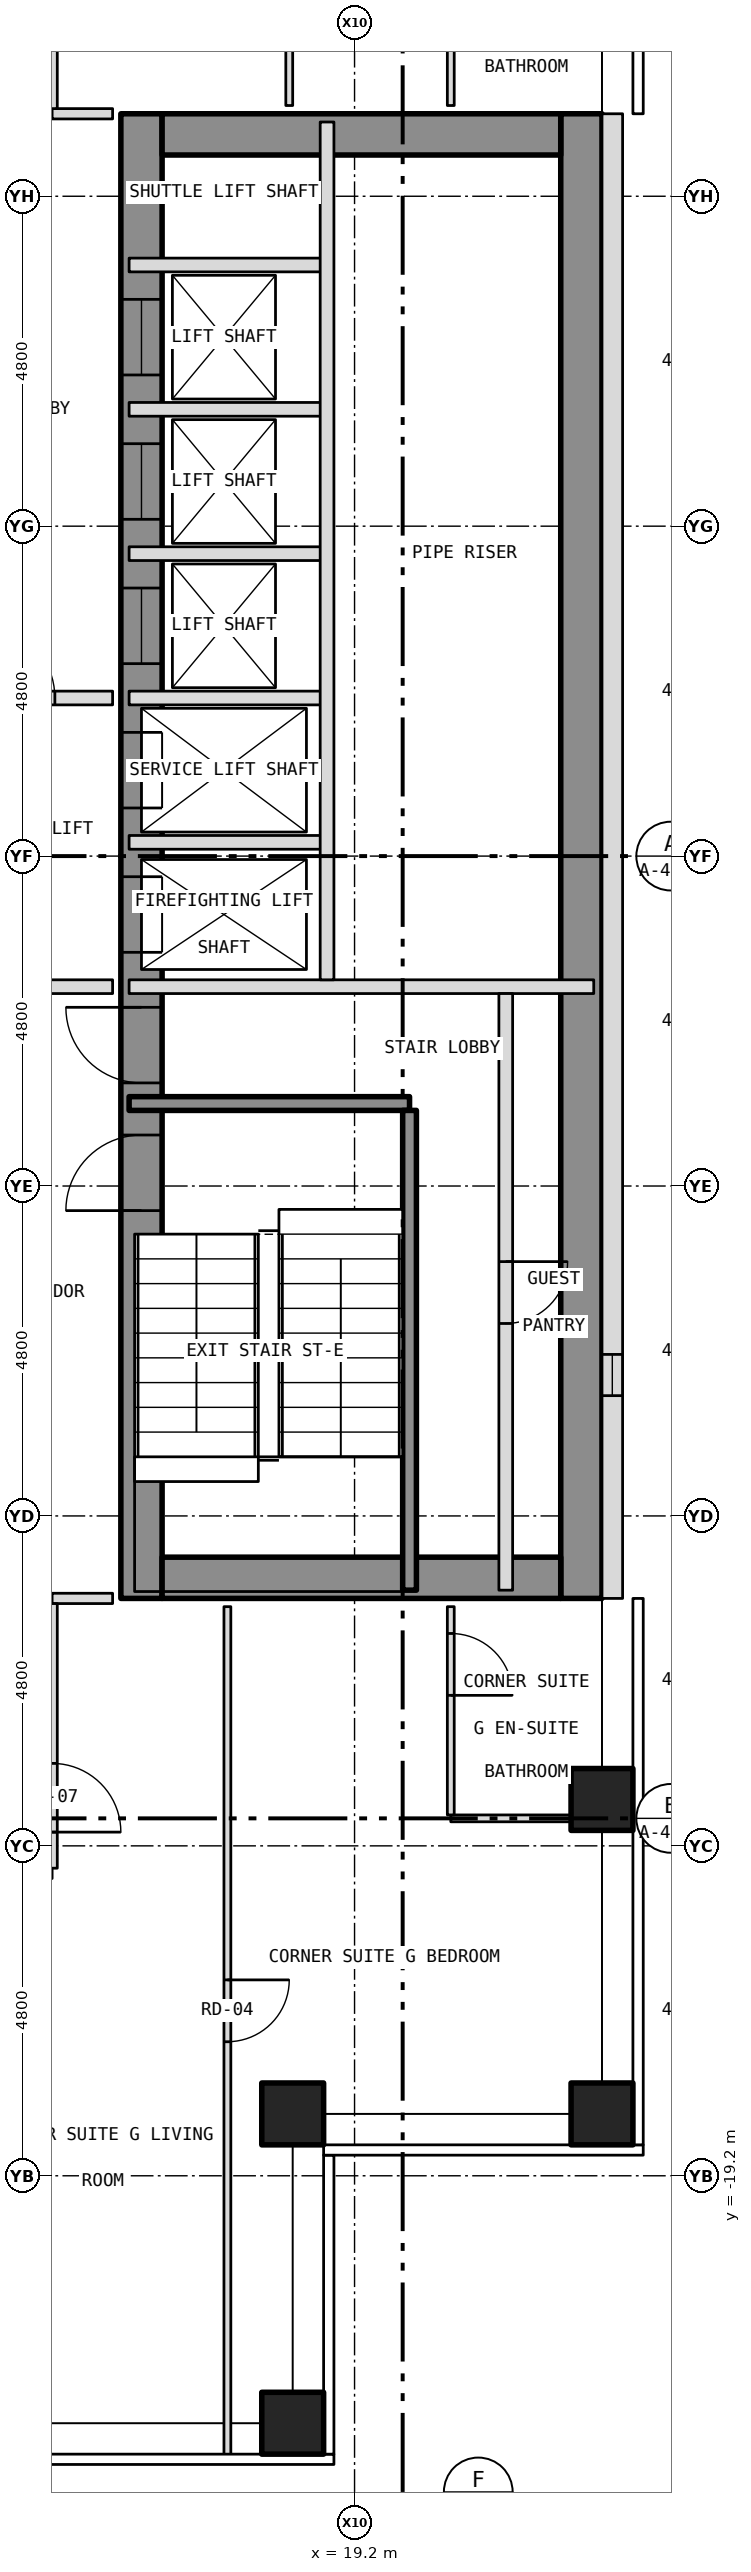
"""IFC4 building model, lengths in metres.
Left out: names, types, materials, properties, quantities, classifications, styles, units other than length and angle.
Written with IfcOpenShell. Run it as: python <this file> out.ifc"""

import sys

from ifc_helpers import new_model, si_unit, direction, frame, frame_2d, origin, origin_2d, place, context, subcontext, project, spatial, rectangle, hollow_rectangle, extrude, element, fill, save


model = new_model("IFC4")
c1 = context("Model", 3, precision=1e-05, world=origin(), true_north=direction((0.0, 1.0)))
c2 = subcontext(c1, "Body", "Model", "MODEL_VIEW")
j1 = project(units=[si_unit("LENGTHUNIT", "METRE"), si_unit("PLANEANGLEUNIT", "RADIAN")], contexts=[c1])
p1 = place(None, origin())
s1 = spatial("IfcSite", under=j1, at=p1, CompositionType="ELEMENT")
p2 = place(p1, origin())
s2 = spatial("IfcBuilding", under=s1, at=p2, CompositionType="ELEMENT")
p3 = place(p2, frame((0.0, 0.0, 124.0)))
s3 = spatial("IfcBuildingStorey", under=s2, at=p3, CompositionType="ELEMENT", Elevation=124.0)
for number, where, z_axis, x_axis in (
    (1, (18.3, -22.8, -0.15), (0.0, 0.0, 1.0), (1.0, 0.0, 0.0)),
    (2, (22.8, -18.3, -0.15), (0.0, 0.0, 1.0), (1.0, 0.0, 0.0)),
    (3, (22.8, -13.725, -0.15), (0.0, 0.0, 1.0), (1.0, 0.0, 0.0)),
    (4, (18.3, -18.3, -0.15), (0.0, 0.0, 1.0), (1.0, 0.0, 0.0)),
):
    element("IfcColumn", number, at=place(p3, frame(where, z_axis=z_axis, x_axis=x_axis)), inside=s3, PredefinedType="COLUMN", context=c2, shape_type="SweptSolid", body=[
        extrude(hollow_rectangle(XDim=0.9, YDim=0.9, WallThickness=0.05, at=origin_2d()), origin(), (0.0, 0.0, 1.0), 3.5),
    ])
p4 = place(p3, frame((16.1, -10.8, 0.0), z_axis=(0.0, 0.0, 1.0), x_axis=(0.0, 1.0, 0.0)))
e5 = element("IfcWall", 5, at=p4, inside=s3, PredefinedType="SHEAR", context=c2, shape_type="SweptSolid", body=[
    extrude(rectangle(XDim=21.6, YDim=0.6, at=frame_2d((10.8, 0.0))), origin(), (0.0, 0.0, 1.0), 3.25),
])
p5 = place(p4, frame((9.4, 0.0, 0.0)))
e6 = element("IfcOpeningElement", 6, at=p5, cuts=e5, PredefinedType="OPENING", context=c2, shape_type="SweptSolid", body=[
    extrude(rectangle(XDim=1.1, YDim=2.1, at=frame_2d((0.55, 1.05))), frame((0.0, 0.312, 0.0), z_axis=(0.0, -1.0, 0.0), x_axis=(1.0, 0.0, 0.0)), (0.0, 0.0, 1.0), 0.624),
])
p6 = place(p4, frame((11.5, 0.0, 0.0)))
e7 = element("IfcOpeningElement", 7, at=p6, cuts=e5, PredefinedType="OPENING", context=c2, shape_type="SweptSolid", body=[
    extrude(rectangle(XDim=1.1, YDim=2.1, at=frame_2d((0.55, 1.05))), frame((0.0, 0.312, 0.0), z_axis=(0.0, -1.0, 0.0), x_axis=(1.0, 0.0, 0.0)), (0.0, 0.0, 1.0), 0.624),
])
p7 = place(p4, frame((13.6, 0.0, 0.0)))
e8 = element("IfcOpeningElement", 8, at=p7, cuts=e5, PredefinedType="OPENING", context=c2, shape_type="SweptSolid", body=[
    extrude(rectangle(XDim=1.1, YDim=2.1, at=frame_2d((0.55, 1.05))), frame((0.0, 0.312, 0.0), z_axis=(0.0, -1.0, 0.0), x_axis=(1.0, 0.0, 0.0)), (0.0, 0.0, 1.0), 0.624),
])
p8 = place(p4, frame((15.7, 0.0, 0.0)))
e9 = element("IfcOpeningElement", 9, at=p8, cuts=e5, PredefinedType="OPENING", context=c2, shape_type="SweptSolid", body=[
    extrude(rectangle(XDim=1.1, YDim=2.1, at=frame_2d((0.55, 1.05))), frame((0.0, 0.312, 0.0), z_axis=(0.0, -1.0, 0.0), x_axis=(1.0, 0.0, 0.0)), (0.0, 0.0, 1.0), 0.624),
])
p9 = place(p4, frame((17.8, 0.0, 0.0)))
e10 = element("IfcOpeningElement", 10, at=p9, cuts=e5, PredefinedType="OPENING", context=c2, shape_type="SweptSolid", body=[
    extrude(rectangle(XDim=1.1, YDim=2.1, at=frame_2d((0.55, 1.05))), frame((0.0, 0.312, 0.0), z_axis=(0.0, -1.0, 0.0), x_axis=(1.0, 0.0, 0.0)), (0.0, 0.0, 1.0), 0.624),
])
p10 = place(p4, frame((5.642, 0.0, 0.0)))
e11 = element("IfcOpeningElement", 11, at=p10, cuts=e5, PredefinedType="OPENING", context=c2, shape_type="SweptSolid", body=[
    extrude(rectangle(XDim=1.1, YDim=2.1, at=frame_2d((0.55, 1.05))), frame((0.0, 0.312, 0.0), z_axis=(0.0, -1.0, 0.0), x_axis=(1.0, 0.0, 0.0)), (0.0, 0.0, 1.0), 0.624),
])
p11 = place(p4, frame((7.5, 0.0, 0.0)))
e12 = element("IfcOpeningElement", 12, at=p11, cuts=e5, PredefinedType="OPENING", context=c2, shape_type="SweptSolid", body=[
    extrude(rectangle(XDim=1.1, YDim=2.1, at=frame_2d((0.55, 1.05))), frame((0.0, 0.312, 0.0), z_axis=(0.0, -1.0, 0.0), x_axis=(1.0, 0.0, 0.0)), (0.0, 0.0, 1.0), 0.624),
])
p12 = place(p3, frame((22.5, -10.8, 0.0), z_axis=(0.0, 0.0, 1.0), x_axis=(0.0, 1.0, 0.0)))
e13 = element("IfcWall", 13, at=p12, inside=s3, PredefinedType="SHEAR", context=c2, shape_type="SweptSolid", body=[
    extrude(rectangle(XDim=21.6, YDim=0.6, at=frame_2d((10.8, 0.0))), origin(), (0.0, 0.0, 1.0), 3.25),
])
for number, where, z_axis, x_axis in (
    (14, (16.4, 10.5, 0.0), (0.0, 0.0, 1.0), (1.0, 0.0, 0.0)),
    (15, (16.4, -10.5, 0.0), (0.0, 0.0, 1.0), (1.0, 0.0, 0.0)),
):
    element("IfcWall", number, at=place(p3, frame(where, z_axis=z_axis, x_axis=x_axis)), inside=s3, PredefinedType="SHEAR", context=c2, shape_type="SweptSolid", body=[
        extrude(rectangle(XDim=5.8, YDim=0.6, at=frame_2d((2.9, 0.0))), origin(), (0.0, 0.0, 1.0), 3.25),
    ])
p13 = place(p3, frame((22.95, -10.8, 0.0), z_axis=(0.0, 0.0, 1.0), x_axis=(0.0, 1.0, 0.0)))
e16 = element("IfcWall", 16, at=p13, inside=s3, PredefinedType="SOLIDWALL", context=c2, shape_type="SweptSolid", body=[
    extrude(rectangle(XDim=21.6, YDim=0.3, at=frame_2d((10.8, 0.0))), origin(), (0.0, 0.0, 1.0), 3.5),
])
p14 = place(p13, frame((2.95, 0.0, 1.0)))
e17 = element("IfcOpeningElement", 17, at=p14, cuts=e16, PredefinedType="OPENING", context=c2, shape_type="SweptSolid", body=[
    extrude(rectangle(XDim=0.6, YDim=1.5, at=frame_2d((0.3, 0.75))), frame((0.0, 0.162, 0.0), z_axis=(0.0, -1.0, 0.0), x_axis=(1.0, 0.0, 0.0)), (0.0, 0.0, 1.0), 0.324),
])
p15 = place(p3, frame((20.6, -14.0, 0.0), z_axis=(0.0, 0.0, 1.0), x_axis=(1.0, 0.0, 0.0)))
e18 = element("IfcWall", 18, at=p15, inside=s3, PredefinedType="PARTITIONING", context=c2, shape_type="SweptSolid", body=[
    extrude(rectangle(XDim=2.08, YDim=0.1, at=frame_2d((1.04, 0.0))), origin(), (0.0, 0.0, 1.0), 3.35),
])
p16 = place(p3, frame((14.8, -10.8, 0.0), z_axis=(0.0, 0.0, 1.0), x_axis=(1.0, 0.0, 0.0)))
e19 = element("IfcWall", 19, at=p16, inside=s3, PredefinedType="PARTITIONING", context=c2, shape_type="SweptSolid", body=[
    extrude(rectangle(XDim=0.88, YDim=0.15, at=frame_2d((0.44, 0.0))), origin(), (0.0, 0.0, 1.0), 3.35),
])
p17 = place(p3, frame((15.92, -3.6, 0.0), z_axis=(0.0, 0.0, 1.0), x_axis=(1.0, 0.0, 0.0)))
e20 = element("IfcWall", 20, at=p17, inside=s3, PredefinedType="SHEAR", context=c2, shape_type="SweptSolid", body=[
    extrude(rectangle(XDim=4.08, YDim=0.2, at=frame_2d((2.04, 0.0))), origin(), (0.0, 0.0, 1.0), 3.25),
])
p18 = place(p3, frame((12.4, -1.9, 0.0), z_axis=(0.0, 0.0, 1.0), x_axis=(1.0, 0.0, 0.0)))
e21 = element("IfcWall", 21, at=p18, inside=s3, PredefinedType="PARTITIONING", context=c2, shape_type="SweptSolid", body=[
    extrude(rectangle(XDim=3.28, YDim=0.2, at=frame_2d((1.64, 0.0))), origin(), (0.0, 0.0, 1.0), 3.35),
])
p19 = place(p18, frame((1.24, 0.0, 0.0)))
e22 = element("IfcOpeningElement", 22, at=p19, cuts=e21, PredefinedType="OPENING", context=c2, shape_type="SweptSolid", body=[
    extrude(rectangle(XDim=1.1, YDim=2.1, at=frame_2d((0.55, 1.05))), frame((0.0, 0.112, 0.0), z_axis=(0.0, -1.0, 0.0), x_axis=(1.0, 0.0, 0.0)), (0.0, 0.0, 1.0), 0.224),
])
p20 = place(p3, frame((15.92, -1.9, 0.0), z_axis=(0.0, 0.0, 1.0), x_axis=(1.0, 0.0, 0.0)))
e23 = element("IfcWall", 23, at=p20, inside=s3, PredefinedType="PARTITIONING", context=c2, shape_type="SweptSolid", body=[
    extrude(rectangle(XDim=6.76, YDim=0.2, at=frame_2d((3.38, 0.0))), origin(), (0.0, 0.0, 1.0), 3.25),
])
p21 = place(p3, frame((15.92, 0.2, 0.0), z_axis=(0.0, 0.0, 1.0), x_axis=(1.0, 0.0, 0.0)))
e24 = element("IfcWall", 24, at=p21, inside=s3, PredefinedType="PARTITIONING", context=c2, shape_type="SweptSolid", body=[
    extrude(rectangle(XDim=2.88, YDim=0.2, at=frame_2d((1.44, 0.0))), origin(), (0.0, 0.0, 1.0), 3.25),
])
p22 = place(p3, frame((12.4, 2.3, 0.0), z_axis=(0.0, 0.0, 1.0), x_axis=(1.0, 0.0, 0.0)))
e25 = element("IfcWall", 25, at=p22, inside=s3, PredefinedType="PARTITIONING", context=c2, shape_type="SweptSolid", body=[
    extrude(rectangle(XDim=3.28, YDim=0.2, at=frame_2d((1.64, 0.0))), origin(), (0.0, 0.0, 1.0), 3.35),
])
p23 = place(p22, frame((1.34, 0.0, 0.0)))
e26 = element("IfcOpeningElement", 26, at=p23, cuts=e25, PredefinedType="OPENING", context=c2, shape_type="SweptSolid", body=[
    extrude(rectangle(XDim=1.1, YDim=2.1, at=frame_2d((0.55, 1.05))), frame((0.0, 0.112, 0.0), z_axis=(0.0, -1.0, 0.0), x_axis=(1.0, 0.0, 0.0)), (0.0, 0.0, 1.0), 0.224),
])
for number, where, z_axis, x_axis in (
    (27, (15.92, 2.3, 0.0), (0.0, 0.0, 1.0), (1.0, 0.0, 0.0)),
    (28, (15.92, 4.4, 0.0), (0.0, 0.0, 1.0), (1.0, 0.0, 0.0)),
    (29, (15.92, 6.5, 0.0), (0.0, 0.0, 1.0), (1.0, 0.0, 0.0)),
    (30, (15.92, 8.6, 0.0), (0.0, 0.0, 1.0), (1.0, 0.0, 0.0)),
):
    element("IfcWall", number, at=place(p3, frame(where, z_axis=z_axis, x_axis=x_axis)), inside=s3, PredefinedType="PARTITIONING", context=c2, shape_type="SweptSolid", body=[
        extrude(rectangle(XDim=2.88, YDim=0.2, at=frame_2d((1.44, 0.0))), origin(), (0.0, 0.0, 1.0), 3.25),
    ])
p24 = place(p3, frame((14.8, 10.8, 0.0), z_axis=(0.0, 0.0, 1.0), x_axis=(1.0, 0.0, 0.0)))
e31 = element("IfcWall", 31, at=p24, inside=s3, PredefinedType="PARTITIONING", context=c2, shape_type="SweptSolid", body=[
    extrude(rectangle(XDim=0.88, YDim=0.15, at=frame_2d((0.44, 0.0))), origin(), (0.0, 0.0, 1.0), 3.35),
])
p25 = place(p3, frame((14.8, -14.725, 0.0), z_axis=(0.0, 0.0, 1.0), x_axis=(0.0, 1.0, 0.0)))
e32 = element("IfcWall", 32, at=p25, inside=s3, PredefinedType="PARTITIONING", context=c2, shape_type="SweptSolid", body=[
    extrude(rectangle(XDim=3.85, YDim=0.15, at=frame_2d((1.925, 0.0))), origin(), (0.0, 0.0, 1.0), 3.35),
])
p26 = place(p25, frame((0.525, 0.0, 0.0)))
e33 = element("IfcOpeningElement", 33, at=p26, cuts=e32, PredefinedType="OPENING", context=c2, shape_type="SweptSolid", body=[
    extrude(rectangle(XDim=1.0, YDim=2.1, at=frame_2d((0.5, 1.05))), frame((0.0, 0.087, 0.0), z_axis=(0.0, -1.0, 0.0), x_axis=(1.0, 0.0, 0.0)), (0.0, 0.0, 1.0), 0.174),
])
p27 = place(p3, frame((14.8, 10.875, 0.0), z_axis=(0.0, 0.0, 1.0), x_axis=(0.0, 1.0, 0.0)))
e34 = element("IfcWall", 34, at=p27, inside=s3, PredefinedType="PARTITIONING", context=c2, shape_type="SweptSolid", body=[
    extrude(rectangle(XDim=3.85, YDim=0.15, at=frame_2d((1.925, 0.0))), origin(), (0.0, 0.0, 1.0), 3.35),
])
p28 = place(p27, frame((2.325, 0.0, 0.0)))
e35 = element("IfcOpeningElement", 35, at=p28, cuts=e34, PredefinedType="OPENING", context=c2, shape_type="SweptSolid", body=[
    extrude(rectangle(XDim=1.0, YDim=2.1, at=frame_2d((0.5, 1.05))), frame((0.0, 0.087, 0.0), z_axis=(0.0, -1.0, 0.0), x_axis=(1.0, 0.0, 0.0)), (0.0, 0.0, 1.0), 0.174),
])
p29 = place(p3, frame((17.35, -23.28, 0.0), z_axis=(0.0, 0.0, 1.0), x_axis=(0.0, 1.0, 0.0)))
e36 = element("IfcWall", 36, at=p29, inside=s3, PredefinedType="PARTITIONING", context=c2, shape_type="SweptSolid", body=[
    extrude(rectangle(XDim=12.36, YDim=0.1, at=frame_2d((6.18, 0.0))), origin(), (0.0, 0.0, 1.0), 3.35),
])
p30 = place(p29, frame((6.03, 0.0, 0.0)))
e37 = element("IfcOpeningElement", 37, at=p30, cuts=e36, PredefinedType="OPENING", context=c2, shape_type="SweptSolid", body=[
    extrude(rectangle(XDim=0.9, YDim=2.1, at=frame_2d((0.45, 1.05))), frame((0.0, 0.062, 0.0), z_axis=(0.0, -1.0, 0.0), x_axis=(1.0, 0.0, 0.0)), (0.0, 0.0, 1.0), 0.124),
])
p31 = place(p3, frame((18.25, 10.92, 0.0), z_axis=(0.0, 0.0, 1.0), x_axis=(0.0, 1.0, 0.0)))
e38 = element("IfcWall", 38, at=p31, inside=s3, PredefinedType="PARTITIONING", context=c2, shape_type="SweptSolid", body=[
    extrude(rectangle(XDim=7.271, YDim=0.1, at=frame_2d((3.635, 0.0))), origin(), (0.0, 0.0, 1.0), 3.35),
])
p32 = place(p31, frame((5.43, 0.0, 0.0)))
e39 = element("IfcOpeningElement", 39, at=p32, cuts=e38, PredefinedType="OPENING", context=c2, shape_type="SweptSolid", body=[
    extrude(rectangle(XDim=0.9, YDim=2.1, at=frame_2d((0.45, 1.05))), frame((0.0, 0.062, 0.0), z_axis=(0.0, -1.0, 0.0), x_axis=(1.0, 0.0, 0.0)), (0.0, 0.0, 1.0), 0.124),
])
p33 = place(p3, frame((18.8, -1.8, 0.0), z_axis=(0.0, 0.0, 1.0), x_axis=(0.0, 1.0, 0.0)))
e40 = element("IfcWall", 40, at=p33, inside=s3, PredefinedType="PARTITIONING", context=c2, shape_type="SweptSolid", body=[
    extrude(rectangle(XDim=12.48, YDim=0.2, at=frame_2d((6.24, 0.0))), origin(), (0.0, 0.0, 1.0), 3.25),
])
p34 = place(p3, frame((20.0, -10.68, 0.0), z_axis=(0.0, 0.0, 1.0), x_axis=(0.0, 1.0, 0.0)))
e41 = element("IfcWall", 41, at=p34, inside=s3, PredefinedType="SHEAR", context=c2, shape_type="SweptSolid", body=[
    extrude(rectangle(XDim=6.98, YDim=0.2, at=frame_2d((3.49, 0.0))), origin(), (0.0, 0.0, 1.0), 3.25),
])
p35 = place(p3, frame((20.6, -13.95, 0.0), z_axis=(0.0, 0.0, 1.0), x_axis=(0.0, 1.0, 0.0)))
e42 = element("IfcWall", 42, at=p35, inside=s3, PredefinedType="PARTITIONING", context=c2, shape_type="SweptSolid", body=[
    extrude(rectangle(XDim=3.03, YDim=0.1, at=frame_2d((1.515, 0.0))), origin(), (0.0, 0.0, 1.0), 3.35),
])
p36 = place(p35, frame((1.74, 0.0, 0.0)))
e43 = element("IfcOpeningElement", 43, at=p36, cuts=e42, PredefinedType="OPENING", context=c2, shape_type="SweptSolid", body=[
    extrude(rectangle(XDim=0.9, YDim=2.1, at=frame_2d((0.45, 1.05))), frame((0.0, 0.062, 0.0), z_axis=(0.0, -1.0, 0.0), x_axis=(1.0, 0.0, 0.0)), (0.0, 0.0, 1.0), 0.124),
])
p37 = place(p3, frame((20.6, 10.92, 0.0), z_axis=(0.0, 0.0, 1.0), x_axis=(0.0, 1.0, 0.0)))
e44 = element("IfcWall", 44, at=p37, inside=s3, PredefinedType="PARTITIONING", context=c2, shape_type="SweptSolid", body=[
    extrude(rectangle(XDim=3.03, YDim=0.1, at=frame_2d((1.515, 0.0))), origin(), (0.0, 0.0, 1.0), 3.35),
])
p38 = place(p37, frame((1.67, 0.0, 0.0)))
e45 = element("IfcOpeningElement", 45, at=p38, cuts=e44, PredefinedType="OPENING", context=c2, shape_type="SweptSolid", body=[
    extrude(rectangle(XDim=0.9, YDim=2.1, at=frame_2d((0.45, 1.05))), frame((0.0, 0.062, 0.0), z_axis=(0.0, -1.0, 0.0), x_axis=(1.0, 0.0, 0.0)), (0.0, 0.0, 1.0), 0.124),
])
p39 = place(p3, frame((21.4, -10.68, 0.0), z_axis=(0.0, 0.0, 1.0), x_axis=(0.0, 1.0, 0.0)))
e46 = element("IfcWall", 46, at=p39, inside=s3, PredefinedType="PARTITIONING", context=c2, shape_type="SweptSolid", body=[
    extrude(rectangle(XDim=8.68, YDim=0.2, at=frame_2d((4.34, 0.0))), origin(), (0.0, 0.0, 1.0), 3.25),
])
p40 = place(p39, frame((3.88, 0.0, 0.0)))
e47 = element("IfcOpeningElement", 47, at=p40, cuts=e46, PredefinedType="OPENING", context=c2, shape_type="SweptSolid", body=[
    extrude(rectangle(XDim=0.9, YDim=2.1, at=frame_2d((0.45, 1.05))), frame((0.0, 0.112, 0.0), z_axis=(0.0, -1.0, 0.0), x_axis=(1.0, 0.0, 0.0)), (0.0, 0.0, 1.0), 0.224),
])
p41 = place(p14, origin())
e48 = element("IfcWindow", 48, at=p41, inside=s3, PartitioningType="SINGLE_PANEL", PredefinedType="WINDOW", context=c2, shape_type="SweptSolid", body=[
    extrude(rectangle(XDim=0.6, YDim=1.5, at=frame_2d((0.3, 0.75))), frame((0.0, -0.06, 0.0), z_axis=(0.0, -1.0, 0.0), x_axis=(1.0, 0.0, 0.0)), (0.0, 0.0, 1.0), 0.06),
])
fill(e17, e48)
p42 = place(p5, origin())
e49 = element("IfcDoor", 49, at=p42, inside=s3, OperationType="SLIDING_TO_LEFT", PredefinedType="DOOR", context=c2, shape_type="SweptSolid", body=[
    extrude(rectangle(XDim=1.1, YDim=2.1, at=frame_2d((0.55, 1.05))), frame((0.0, 0.025, 0.0), z_axis=(0.0, -1.0, 0.0), x_axis=(1.0, 0.0, 0.0)), (0.0, 0.0, 1.0), 0.05),
])
fill(e6, e49)
p43 = place(p6, origin())
e50 = element("IfcDoor", 50, at=p43, inside=s3, OperationType="SLIDING_TO_LEFT", PredefinedType="DOOR", context=c2, shape_type="SweptSolid", body=[
    extrude(rectangle(XDim=1.1, YDim=2.1, at=frame_2d((0.55, 1.05))), frame((0.0, 0.025, 0.0), z_axis=(0.0, -1.0, 0.0), x_axis=(1.0, 0.0, 0.0)), (0.0, 0.0, 1.0), 0.05),
])
fill(e7, e50)
p44 = place(p7, origin())
e51 = element("IfcDoor", 51, at=p44, inside=s3, OperationType="SLIDING_TO_LEFT", PredefinedType="DOOR", context=c2, shape_type="SweptSolid", body=[
    extrude(rectangle(XDim=1.1, YDim=2.1, at=frame_2d((0.55, 1.05))), frame((0.0, 0.025, 0.0), z_axis=(0.0, -1.0, 0.0), x_axis=(1.0, 0.0, 0.0)), (0.0, 0.0, 1.0), 0.05),
])
fill(e8, e51)
p45 = place(p8, origin())
e52 = element("IfcDoor", 52, at=p45, inside=s3, OperationType="SLIDING_TO_LEFT", PredefinedType="DOOR", context=c2, shape_type="SweptSolid", body=[
    extrude(rectangle(XDim=1.1, YDim=2.1, at=frame_2d((0.55, 1.05))), frame((0.0, 0.025, 0.0), z_axis=(0.0, -1.0, 0.0), x_axis=(1.0, 0.0, 0.0)), (0.0, 0.0, 1.0), 0.05),
])
fill(e9, e52)
p46 = place(p9, origin())
e53 = element("IfcDoor", 53, at=p46, inside=s3, OperationType="SLIDING_TO_LEFT", PredefinedType="DOOR", context=c2, shape_type="SweptSolid", body=[
    extrude(rectangle(XDim=1.1, YDim=2.1, at=frame_2d((0.55, 1.05))), frame((0.0, 0.025, 0.0), z_axis=(0.0, -1.0, 0.0), x_axis=(1.0, 0.0, 0.0)), (0.0, 0.0, 1.0), 0.05),
])
fill(e10, e53)
p47 = place(p10, origin())
e54 = element("IfcDoor", 54, at=p47, inside=s3, OperationType="SINGLE_SWING_LEFT", PredefinedType="DOOR", context=c2, shape_type="SweptSolid", body=[
    extrude(rectangle(XDim=1.1, YDim=2.1, at=frame_2d((0.55, 1.05))), frame((0.0, 0.025, 0.0), z_axis=(0.0, -1.0, 0.0), x_axis=(1.0, 0.0, 0.0)), (0.0, 0.0, 1.0), 0.05),
])
fill(e11, e54)
p48 = place(p11, origin())
e55 = element("IfcDoor", 55, at=p48, inside=s3, OperationType="SINGLE_SWING_RIGHT", PredefinedType="DOOR", context=c2, shape_type="SweptSolid", body=[
    extrude(rectangle(XDim=1.1, YDim=2.1, at=frame_2d((0.55, 1.05))), frame((0.0, 0.025, 0.0), z_axis=(0.0, -1.0, 0.0), x_axis=(1.0, 0.0, 0.0)), (0.0, 0.0, 1.0), 0.05),
])
fill(e12, e55)
p49 = place(p40, origin())
e56 = element("IfcDoor", 56, at=p49, inside=s3, OperationType="SINGLE_SWING_RIGHT", PredefinedType="DOOR", context=c2, shape_type="SweptSolid", body=[
    extrude(rectangle(XDim=0.9, YDim=2.1, at=frame_2d((0.45, 1.05))), frame((0.0, 0.025, 0.0), z_axis=(0.0, -1.0, 0.0), x_axis=(1.0, 0.0, 0.0)), (0.0, 0.0, 1.0), 0.05),
])
fill(e47, e56)
p50 = place(p23, origin())
e57 = element("IfcDoor", 57, at=p50, inside=s3, OperationType="SINGLE_SWING_LEFT", PredefinedType="DOOR", context=c2, shape_type="SweptSolid", body=[
    extrude(rectangle(XDim=1.1, YDim=2.1, at=frame_2d((0.55, 1.05))), frame((0.0, 0.025, 0.0), z_axis=(0.0, -1.0, 0.0), x_axis=(1.0, 0.0, 0.0)), (0.0, 0.0, 1.0), 0.05),
])
fill(e26, e57)
p51 = place(p26, origin())
e58 = element("IfcDoor", 58, at=p51, inside=s3, OperationType="SINGLE_SWING_LEFT", PredefinedType="DOOR", context=c2, shape_type="SweptSolid", body=[
    extrude(rectangle(XDim=1.0, YDim=2.1, at=frame_2d((0.5, 1.05))), frame((0.0, 0.025, 0.0), z_axis=(0.0, -1.0, 0.0), x_axis=(1.0, 0.0, 0.0)), (0.0, 0.0, 1.0), 0.05),
])
fill(e33, e58)
p52 = place(p30, origin())
e59 = element("IfcDoor", 59, at=p52, inside=s3, OperationType="SINGLE_SWING_RIGHT", PredefinedType="DOOR", context=c2, shape_type="SweptSolid", body=[
    extrude(rectangle(XDim=0.9, YDim=2.1, at=frame_2d((0.45, 1.05))), frame((0.0, 0.025, 0.0), z_axis=(0.0, -1.0, 0.0), x_axis=(1.0, 0.0, 0.0)), (0.0, 0.0, 1.0), 0.05),
])
fill(e37, e59)
p53 = place(p36, origin())
e60 = element("IfcDoor", 60, at=p53, inside=s3, OperationType="SINGLE_SWING_LEFT", PredefinedType="DOOR", context=c2, shape_type="SweptSolid", body=[
    extrude(rectangle(XDim=0.9, YDim=2.1, at=frame_2d((0.45, 1.05))), frame((0.0, 0.025, 0.0), z_axis=(0.0, -1.0, 0.0), x_axis=(1.0, 0.0, 0.0)), (0.0, 0.0, 1.0), 0.05),
])
fill(e43, e60)
save(model, sys.argv[1])
